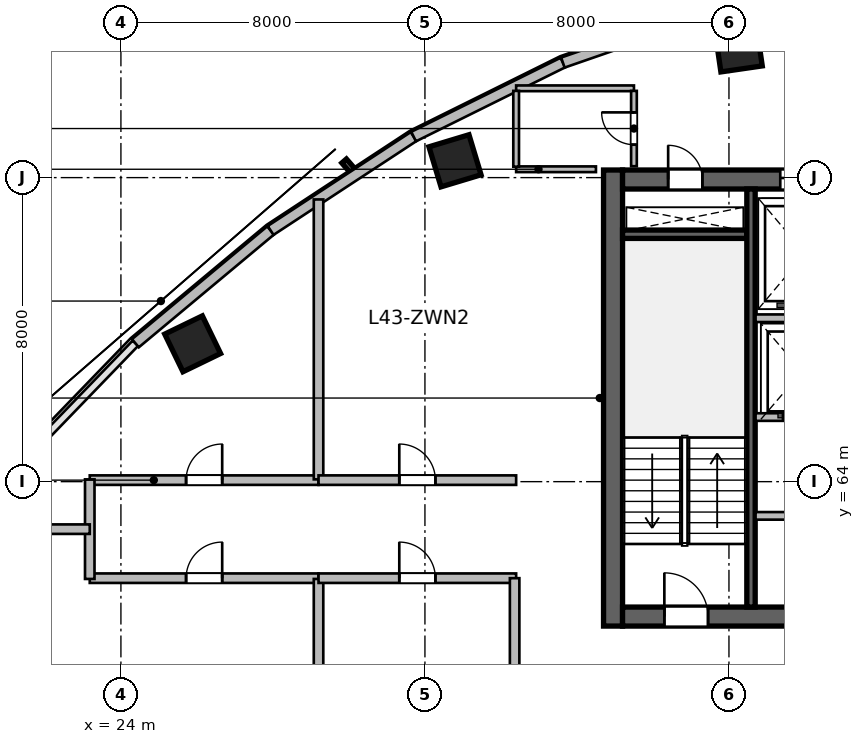
"""IFC4 building model, lengths in metres.
Left out: names, types, materials, properties, quantities, classifications, styles, units other than length and angle.
Written with IfcOpenShell. Run it as: python <this file> out.ifc"""

import sys

from ifc_helpers import new_model, si_unit, direction, frame, frame_2d, origin, origin_2d, place, context, subcontext, project, spatial, rectangle, extrude, source, transform, mapped, element, fill, save


model = new_model("IFC4")
c1 = context("Model", 3, precision=1e-05, world=origin(), true_north=direction((0.0, 1.0)))
c2 = subcontext(c1, "Body", "Model", "MODEL_VIEW")
j1 = project(units=[si_unit("LENGTHUNIT", "METRE"), si_unit("PLANEANGLEUNIT", "RADIAN")], contexts=[c1])
p1 = place(None, origin())
s1 = spatial("IfcSite", under=j1, at=p1, CompositionType="ELEMENT")
p2 = place(p1, origin())
s2 = spatial("IfcBuilding", under=s1, at=p2, CompositionType="ELEMENT")
p3 = place(p2, frame((0.0, 0.0, 177.9)))
s3 = spatial("IfcBuildingStorey", under=s2, at=p3, CompositionType="ELEMENT", Elevation=177.9)
m1 = source(origin(), c2, "Body", "SweptSolid", [
    extrude(rectangle(XDim=12.0, YDim=0.5, at=frame_2d((6.0, 0.0))), origin(), (0.0, 0.0, 1.0), 3.9),
])
p4 = place(p3, frame((36.95, 60.2, 0.0), z_axis=(0.0, 0.0, 1.0), x_axis=(0.0, 1.0, 0.0)))
e1 = element("IfcWall", 1, at=p4, inside=s3, PredefinedType="SHEAR", context=c2, shape_type="MappedRepresentation", body=[
    mapped(m1, transform((0.0, 0.0, 0.0), scale=1.0)),
])
m2 = source(origin(), c2, "Body", "SweptSolid", [
    extrude(rectangle(XDim=21.6, YDim=0.5, at=frame_2d((10.8, 0.0))), origin(), (0.0, 0.0, 1.0), 3.9),
])
p5 = place(p3, frame((37.2, 60.45, 0.0), z_axis=(0.0, 0.0, 1.0), x_axis=(1.0, 0.0, 0.0)))
e2 = element("IfcWall", 2, at=p5, inside=s3, PredefinedType="SHEAR", context=c2, shape_type="MappedRepresentation", body=[
    mapped(m2, transform((0.0, 0.0, 0.0), scale=1.0)),
])
p6 = place(p5, frame((1.1, 0.0, 0.0)))
e3 = element("IfcOpeningElement", 3, at=p6, cuts=e2, PredefinedType="OPENING", context=c2, shape_type="SweptSolid", body=[
    extrude(rectangle(XDim=1.15, YDim=2.15, at=frame_2d((0.575, 1.075))), frame((0.0, 0.26, 0.0), z_axis=(0.0, -1.0, 0.0), x_axis=(1.0, 0.0, 0.0)), (0.0, 0.0, 1.0), 0.52),
])
p7 = place(p5, frame((19.5, 0.0, 0.0)))
e4 = element("IfcOpeningElement", 4, at=p7, cuts=e2, PredefinedType="OPENING", context=c2, shape_type="SweptSolid", body=[
    extrude(rectangle(XDim=0.9, YDim=2.1, at=frame_2d((0.45, 1.05))), frame((0.0, 0.26, 0.0), z_axis=(0.0, -1.0, 0.0), x_axis=(1.0, 0.0, 0.0)), (0.0, 0.0, 1.0), 0.52),
])
p8 = place(p5, frame((12.02, 0.0, 0.0)))
e5 = element("IfcOpeningElement", 5, at=p8, cuts=e2, PredefinedType="OPENING", context=c2, shape_type="SweptSolid", body=[
    extrude(rectangle(XDim=1.6, YDim=2.15, at=frame_2d((0.8, 1.075))), frame((0.0, 0.26, 0.0), z_axis=(0.0, -1.0, 0.0), x_axis=(1.0, 0.0, 0.0)), (0.0, 0.0, 1.0), 0.52),
])
p9 = place(p3, frame((37.2, 71.95, 0.0), z_axis=(0.0, 0.0, 1.0), x_axis=(1.0, 0.0, 0.0)))
e6 = element("IfcWall", 6, at=p9, inside=s3, PredefinedType="SHEAR", context=c2, shape_type="MappedRepresentation", body=[
    mapped(m2, transform((0.0, 0.0, 0.0), scale=1.0)),
])
p10 = place(p9, frame((1.2, 0.0, 0.0)))
e7 = element("IfcOpeningElement", 7, at=p10, cuts=e6, PredefinedType="OPENING", context=c2, shape_type="SweptSolid", body=[
    extrude(rectangle(XDim=0.9, YDim=2.1, at=frame_2d((0.45, 1.05))), frame((0.0, 0.26, 0.0), z_axis=(0.0, -1.0, 0.0), x_axis=(1.0, 0.0, 0.0)), (0.0, 0.0, 1.0), 0.52),
])
p11 = place(p9, frame((14.7, 0.0, 0.0)))
e8 = element("IfcOpeningElement", 8, at=p11, cuts=e6, PredefinedType="OPENING", context=c2, shape_type="SweptSolid", body=[
    extrude(rectangle(XDim=1.2, YDim=2.15, at=frame_2d((0.6, 1.075))), frame((0.0, 0.26, 0.0), z_axis=(0.0, -1.0, 0.0), x_axis=(1.0, 0.0, 0.0)), (0.0, 0.0, 1.0), 0.52),
])
p12 = place(p9, frame((4.15, 0.0, 0.0)))
e9 = element("IfcOpeningElement", 9, at=p12, cuts=e6, PredefinedType="OPENING", context=c2, shape_type="SweptSolid", body=[
    extrude(rectangle(XDim=1.3, YDim=2.15, at=frame_2d((0.65, 1.075))), frame((0.0, 0.26, 0.0), z_axis=(0.0, -1.0, 0.0), x_axis=(1.0, 0.0, 0.0)), (0.0, 0.0, 1.0), 0.52),
])
p13 = place(p9, frame((6.76, 0.0, 0.0)))
e10 = element("IfcOpeningElement", 10, at=p13, cuts=e6, PredefinedType="OPENING", context=c2, shape_type="SweptSolid", body=[
    extrude(rectangle(XDim=0.85, YDim=2.1, at=frame_2d((0.425, 1.05))), frame((0.0, 0.26, 0.0), z_axis=(0.0, -1.0, 0.0), x_axis=(1.0, 0.0, 0.0)), (0.0, 0.0, 1.0), 0.52),
])
p14 = place(p9, frame((8.76, 0.0, 0.0)))
e11 = element("IfcOpeningElement", 11, at=p14, cuts=e6, PredefinedType="OPENING", context=c2, shape_type="SweptSolid", body=[
    extrude(rectangle(XDim=0.85, YDim=2.1, at=frame_2d((0.425, 1.05))), frame((0.0, 0.26, 0.0), z_axis=(0.0, -1.0, 0.0), x_axis=(1.0, 0.0, 0.0)), (0.0, 0.0, 1.0), 0.52),
])
p15 = place(p9, frame((10.725, 0.0, 0.0)))
e12 = element("IfcOpeningElement", 12, at=p15, cuts=e6, PredefinedType="OPENING", context=c2, shape_type="SweptSolid", body=[
    extrude(rectangle(XDim=0.85, YDim=2.1, at=frame_2d((0.425, 1.05))), frame((0.0, 0.26, 0.0), z_axis=(0.0, -1.0, 0.0), x_axis=(1.0, 0.0, 0.0)), (0.0, 0.0, 1.0), 0.52),
])
m3 = source(origin(), c2, "Body", "SweptSolid", [
    extrude(rectangle(XDim=3.27, YDim=0.22, at=frame_2d((1.635, 0.0))), origin(), (0.0, 0.0, 1.0), 3.9),
])
p16 = place(p3, frame((37.2, 70.51, 0.0), z_axis=(0.0, 0.0, 1.0), x_axis=(1.0, 0.0, 0.0)))
e13 = element("IfcWall", 13, at=p16, inside=s3, PredefinedType="SHEAR", context=c2, shape_type="MappedRepresentation", body=[
    mapped(m3, transform((0.0, 0.0, 0.0), scale=1.0)),
])
m4 = source(origin(), c2, "Body", "SweptSolid", [
    extrude(rectangle(XDim=11.0, YDim=0.22, at=frame_2d((5.5, 0.0))), origin(), (0.0, 0.0, 1.0), 3.9),
])
p17 = place(p3, frame((40.58, 60.7, 0.0), z_axis=(0.0, 0.0, 1.0), x_axis=(0.0, 1.0, 0.0)))
e14 = element("IfcWall", 14, at=p17, inside=s3, PredefinedType="SHEAR", context=c2, shape_type="MappedRepresentation", body=[
    mapped(m4, transform((0.0, 0.0, 0.0), scale=1.0)),
])
m5 = source(origin(), c2, "Body", "SweptSolid", [
    extrude(rectangle(XDim=1.1, YDim=1.1, at=origin_2d()), origin(), (0.0, 0.0, 1.0), 3.9),
])
for number, where, z_axis, x_axis in (
    (15, (25.888, 67.627, 0.0), (0.0, 0.0, 1.0), (-0.436, 0.9, 0.0)),
    (16, (32.791, 72.442, 0.0), (0.0, 0.0, 1.0), (-0.289, 0.957, 0.0)),
    (17, (40.253, 75.404, 0.0), (0.0, 0.0, 1.0), (-0.143, 0.99, 0.0)),
):
    element("IfcColumn", number, at=place(p3, frame(where, z_axis=z_axis, x_axis=x_axis)), inside=s3, PredefinedType="COLUMN", context=c2, shape_type="MappedRepresentation", body=[
        mapped(m5, transform((0.0, 0.0, 0.0), scale=1.0)),
    ])
m6 = source(origin(), c2, "Body", "SweptSolid", [
    extrude(rectangle(XDim=4.634, YDim=0.28, at=frame_2d((2.317, 0.0))), origin(), (0.0, 0.0, 1.0), 3.65),
])
p18 = place(p3, frame((24.381, 67.642, 0.0), z_axis=(0.0, 0.0, 1.0), x_axis=(0.767910229096, 0.640557475993, 0.0)))
e18 = element("IfcWall", 18, at=p18, inside=s3, PredefinedType="SOLIDWALL", context=c2, shape_type="MappedRepresentation", body=[
    mapped(m6, transform((0.0, 0.0, 0.0), scale=1.0)),
])
m7 = source(origin(), c2, "Body", "SweptSolid", [
    extrude(rectangle(XDim=4.501, YDim=0.28, at=frame_2d((2.25, 0.0))), origin(), (0.0, 0.0, 1.0), 3.65),
])
p19 = place(p3, frame((27.939, 70.61, 0.0), z_axis=(0.0, 0.0, 1.0), x_axis=(0.835984920737, 0.548752414391, 0.0)))
e19 = element("IfcWall", 19, at=p19, inside=s3, PredefinedType="SOLIDWALL", context=c2, shape_type="MappedRepresentation", body=[
    mapped(m7, transform((0.0, 0.0, 0.0), scale=1.0)),
])
m8 = source(origin(), c2, "Body", "SweptSolid", [
    extrude(rectangle(XDim=4.384, YDim=0.28, at=frame_2d((2.192, 0.0))), origin(), (0.0, 0.0, 1.0), 3.65),
])
p20 = place(p3, frame((31.702, 73.08, 0.0), z_axis=(0.0, 0.0, 1.0), x_axis=(0.895969968053, 0.444114643248, 0.0)))
e20 = element("IfcWall", 20, at=p20, inside=s3, PredefinedType="SOLIDWALL", context=c2, shape_type="MappedRepresentation", body=[
    mapped(m8, transform((0.0, 0.0, 0.0), scale=1.0)),
])
m9 = source(origin(), c2, "Body", "SweptSolid", [
    extrude(rectangle(XDim=4.29, YDim=0.28, at=frame_2d((2.145, 0.0))), origin(), (0.0, 0.0, 1.0), 3.65),
])
p21 = place(p3, frame((35.63, 75.027, 0.0), z_axis=(0.0, 0.0, 1.0), x_axis=(0.944883859218, 0.3274057003, 0.0)))
e21 = element("IfcWall", 21, at=p21, inside=s3, PredefinedType="SOLIDWALL", context=c2, shape_type="MappedRepresentation", body=[
    mapped(m9, transform((0.0, 0.0, 0.0), scale=1.0)),
])
m10 = source(origin(), c2, "Body", "SweptSolid", [
    extrude(rectangle(XDim=8.8, YDim=0.2, at=frame_2d((4.4, 0.0))), origin(), (0.0, 0.0, 1.0), 3.65),
])
p22 = place(p3, frame((40.7, 68.3, 0.0), z_axis=(0.0, 0.0, 1.0), x_axis=(1.0, 0.0, 0.0)))
e22 = element("IfcWall", 22, at=p22, inside=s3, PredefinedType="SOLIDWALL", context=c2, shape_type="MappedRepresentation", body=[
    mapped(m10, transform((0.0, 0.0, 0.0), scale=1.0)),
])
m11 = source(origin(), c2, "Body", "SweptSolid", [
    extrude(rectangle(XDim=8.02, YDim=0.2, at=frame_2d((4.01, 0.0))), origin(), (0.0, 0.0, 1.0), 3.65),
])
p23 = place(p3, frame((40.7, 63.1, 0.0), z_axis=(0.0, 0.0, 1.0), x_axis=(1.0, 0.0, 0.0)))
e23 = element("IfcWall", 23, at=p23, inside=s3, PredefinedType="SOLIDWALL", context=c2, shape_type="MappedRepresentation", body=[
    mapped(m11, transform((0.0, 0.0, 0.0), scale=1.0)),
])
p24 = place(p23, frame((2.15, 0.0, 0.0)))
e24 = element("IfcOpeningElement", 24, at=p24, cuts=e23, PredefinedType="OPENING", context=c2, shape_type="SweptSolid", body=[
    extrude(rectangle(XDim=0.9, YDim=2.1, at=frame_2d((0.45, 1.05))), frame((0.0, 0.11, 0.0), z_axis=(0.0, -1.0, 0.0), x_axis=(1.0, 0.0, 0.0)), (0.0, 0.0, 1.0), 0.22),
])
p25 = place(p23, frame((6.09, 0.0, 0.0)))
e25 = element("IfcOpeningElement", 25, at=p25, cuts=e23, PredefinedType="OPENING", context=c2, shape_type="SweptSolid", body=[
    extrude(rectangle(XDim=0.9, YDim=2.1, at=frame_2d((0.45, 1.05))), frame((0.0, 0.11, 0.0), z_axis=(0.0, -1.0, 0.0), x_axis=(1.0, 0.0, 0.0)), (0.0, 0.0, 1.0), 0.22),
])
p26 = place(p3, frame((40.7, 65.7, 0.0), z_axis=(0.0, 0.0, 1.0), x_axis=(1.0, 0.0, 0.0)))
e26 = element("IfcWall", 26, at=p26, inside=s3, PredefinedType="SOLIDWALL", context=c2, shape_type="MappedRepresentation", body=[
    mapped(m10, transform((0.0, 0.0, 0.0), scale=1.0)),
])
p27 = place(p26, frame((0.72, 0.0, 0.0)))
e27 = element("IfcOpeningElement", 27, at=p27, cuts=e26, PredefinedType="OPENING", context=c2, shape_type="SweptSolid", body=[
    extrude(rectangle(XDim=1.0, YDim=2.15, at=frame_2d((0.5, 1.075))), frame((0.0, 0.11, 0.0), z_axis=(0.0, -1.0, 0.0), x_axis=(1.0, 0.0, 0.0)), (0.0, 0.0, 1.0), 0.22),
])
p28 = place(p26, frame((2.62, 0.0, 0.0)))
e28 = element("IfcOpeningElement", 28, at=p28, cuts=e26, PredefinedType="OPENING", context=c2, shape_type="SweptSolid", body=[
    extrude(rectangle(XDim=1.0, YDim=2.15, at=frame_2d((0.5, 1.075))), frame((0.0, 0.11, 0.0), z_axis=(0.0, -1.0, 0.0), x_axis=(1.0, 0.0, 0.0)), (0.0, 0.0, 1.0), 0.22),
])
p29 = place(p26, frame((4.55, 0.0, 0.0)))
e29 = element("IfcOpeningElement", 29, at=p29, cuts=e26, PredefinedType="OPENING", context=c2, shape_type="SweptSolid", body=[
    extrude(rectangle(XDim=1.0, YDim=2.15, at=frame_2d((0.5, 1.075))), frame((0.0, 0.11, 0.0), z_axis=(0.0, -1.0, 0.0), x_axis=(1.0, 0.0, 0.0)), (0.0, 0.0, 1.0), 0.22),
])
p30 = place(p26, frame((6.55, 0.0, 0.0)))
e30 = element("IfcOpeningElement", 30, at=p30, cuts=e26, PredefinedType="OPENING", context=c2, shape_type="SweptSolid", body=[
    extrude(rectangle(XDim=1.0, YDim=2.15, at=frame_2d((0.5, 1.075))), frame((0.0, 0.11, 0.0), z_axis=(0.0, -1.0, 0.0), x_axis=(1.0, 0.0, 0.0)), (0.0, 0.0, 1.0), 0.22),
])
m12 = source(origin(), c2, "Body", "SweptSolid", [
    extrude(rectangle(XDim=2.1, YDim=0.15, at=frame_2d((1.05, 0.0))), origin(), (0.0, 0.0, 1.0), 3.65),
])
p31 = place(p3, frame((34.4, 72.22, 0.0), z_axis=(0.0, 0.0, 1.0), x_axis=(1.0, 0.0, 0.0)))
e31 = element("IfcWall", 31, at=p31, inside=s3, PredefinedType="PARTITIONING", context=c2, shape_type="MappedRepresentation", body=[
    mapped(m12, transform((0.0, 0.0, 0.0), scale=1.0)),
])
m13 = source(origin(), c2, "Body", "SweptSolid", [
    extrude(rectangle(XDim=3.1, YDim=0.15, at=frame_2d((1.55, 0.0))), origin(), (0.0, 0.0, 1.0), 3.022),
])
p32 = place(p3, frame((34.4, 74.35, 0.0), z_axis=(0.0, 0.0, 1.0), x_axis=(1.0, 0.0, 0.0)))
e32 = element("IfcWall", 32, at=p32, inside=s3, PredefinedType="PARTITIONING", context=c2, shape_type="MappedRepresentation", body=[
    mapped(m13, transform((0.0, 0.0, 0.0), scale=1.0)),
])
m14 = source(origin(), c2, "Body", "SweptSolid", [
    extrude(rectangle(XDim=1.995, YDim=0.15, at=frame_2d((0.998, 0.0))), origin(), (0.0, 0.0, 1.0), 3.65),
])
p33 = place(p3, frame((34.4, 72.288, 0.0), z_axis=(0.0, 0.0, 1.0), x_axis=(0.0, 1.0, 0.0)))
e33 = element("IfcWall", 33, at=p33, inside=s3, PredefinedType="PARTITIONING", context=c2, shape_type="MappedRepresentation", body=[
    mapped(m14, transform((0.0, 0.0, 0.0), scale=1.0)),
])
m15 = source(origin(), c2, "Body", "SweptSolid", [
    extrude(rectangle(XDim=1.982, YDim=0.15, at=frame_2d((0.991, 0.0))), origin(), (0.0, 0.0, 1.0), 3.65),
])
p34 = place(p3, frame((37.5, 72.3, 0.0), z_axis=(0.0, 0.0, 1.0), x_axis=(0.0, 1.0, 0.0)))
e34 = element("IfcWall", 34, at=p34, inside=s3, PredefinedType="PARTITIONING", context=c2, shape_type="MappedRepresentation", body=[
    mapped(m15, transform((0.0, 0.0, 0.0), scale=1.0)),
])
p35 = place(p34, frame((0.566, 0.0, 0.0)))
e35 = element("IfcOpeningElement", 35, at=p35, cuts=e34, PredefinedType="OPENING", context=c2, shape_type="SweptSolid", body=[
    extrude(rectangle(XDim=0.85, YDim=2.1, at=frame_2d((0.425, 1.05))), frame((0.0, 0.085, 0.0), z_axis=(0.0, -1.0, 0.0), x_axis=(1.0, 0.0, 0.0)), (0.0, 0.0, 1.0), 0.17),
])
m16 = source(origin(), c2, "Body", "SweptSolid", [
    extrude(rectangle(XDim=6.02, YDim=0.25, at=frame_2d((3.01, 0.0))), origin(), (0.0, 0.0, 1.0), 3.65),
])
p36 = place(p3, frame((23.18, 64.04, 0.0), z_axis=(0.0, 0.0, 1.0), x_axis=(1.0, 0.0, 0.0)))
e36 = element("IfcWall", 36, at=p36, inside=s3, PredefinedType="PARTITIONING", context=c2, shape_type="MappedRepresentation", body=[
    mapped(m16, transform((0.0, 0.0, 0.0), scale=1.0)),
])
p37 = place(p36, frame((2.535, 0.0, 0.0)))
e37 = element("IfcOpeningElement", 37, at=p37, cuts=e36, PredefinedType="OPENING", context=c2, shape_type="SweptSolid", body=[
    extrude(rectangle(XDim=0.95, YDim=2.1, at=frame_2d((0.475, 1.05))), frame((0.0, 0.135, 0.0), z_axis=(0.0, -1.0, 0.0), x_axis=(1.0, 0.0, 0.0)), (0.0, 0.0, 1.0), 0.27),
])
m17 = source(origin(), c2, "Body", "SweptSolid", [
    extrude(rectangle(XDim=7.365, YDim=0.25, at=frame_2d((3.683, 0.0))), origin(), (0.0, 0.0, 1.0), 3.65),
])
p38 = place(p3, frame((29.2, 64.06, 0.0), z_axis=(0.0, 0.0, 1.0), x_axis=(0.0, 1.0, 0.0)))
e38 = element("IfcWall", 38, at=p38, inside=s3, PredefinedType="PARTITIONING", context=c2, shape_type="MappedRepresentation", body=[
    mapped(m17, transform((0.0, 0.0, 0.0), scale=1.0)),
])
m18 = source(origin(), c2, "Body", "SweptSolid", [
    extrude(rectangle(XDim=5.2, YDim=0.25, at=frame_2d((2.6, 0.0))), origin(), (0.0, 0.0, 1.0), 3.65),
])
p39 = place(p3, frame((29.2, 64.04, 0.0), z_axis=(0.0, 0.0, 1.0), x_axis=(1.0, 0.0, 0.0)))
e39 = element("IfcWall", 39, at=p39, inside=s3, PredefinedType="PARTITIONING", context=c2, shape_type="MappedRepresentation", body=[
    mapped(m18, transform((0.0, 0.0, 0.0), scale=1.0)),
])
p40 = place(p39, frame((2.125, 0.0, 0.0)))
e40 = element("IfcOpeningElement", 40, at=p40, cuts=e39, PredefinedType="OPENING", context=c2, shape_type="SweptSolid", body=[
    extrude(rectangle(XDim=0.95, YDim=2.1, at=frame_2d((0.475, 1.05))), frame((0.0, 0.135, 0.0), z_axis=(0.0, -1.0, 0.0), x_axis=(1.0, 0.0, 0.0)), (0.0, 0.0, 1.0), 0.27),
])
p41 = place(p3, frame((23.18, 61.46, 0.0), z_axis=(0.0, 0.0, 1.0), x_axis=(1.0, 0.0, 0.0)))
e41 = element("IfcWall", 41, at=p41, inside=s3, PredefinedType="PARTITIONING", context=c2, shape_type="MappedRepresentation", body=[
    mapped(m16, transform((0.0, 0.0, 0.0), scale=1.0)),
])
p42 = place(p41, frame((2.535, 0.0, 0.0)))
e42 = element("IfcOpeningElement", 42, at=p42, cuts=e41, PredefinedType="OPENING", context=c2, shape_type="SweptSolid", body=[
    extrude(rectangle(XDim=0.95, YDim=2.1, at=frame_2d((0.475, 1.05))), frame((0.0, 0.135, 0.0), z_axis=(0.0, -1.0, 0.0), x_axis=(1.0, 0.0, 0.0)), (0.0, 0.0, 1.0), 0.27),
])
m19 = source(origin(), c2, "Body", "SweptSolid", [
    extrude(rectangle(XDim=18.301, YDim=0.25, at=frame_2d((9.15, 0.0))), origin(), (0.0, 0.0, 1.0), 2.942),
])
p43 = place(p3, frame((29.2, 43.139, 0.0), z_axis=(0.0, 0.0, 1.0), x_axis=(0.0, 1.0, 0.0)))
e43 = element("IfcWall", 43, at=p43, inside=s3, PredefinedType="PARTITIONING", context=c2, shape_type="MappedRepresentation", body=[
    mapped(m19, transform((0.0, 0.0, 0.0), scale=1.0)),
])
p44 = place(p3, frame((29.2, 61.46, 0.0), z_axis=(0.0, 0.0, 1.0), x_axis=(1.0, 0.0, 0.0)))
e44 = element("IfcWall", 44, at=p44, inside=s3, PredefinedType="PARTITIONING", context=c2, shape_type="MappedRepresentation", body=[
    mapped(m18, transform((0.0, 0.0, 0.0), scale=1.0)),
])
p45 = place(p44, frame((2.125, 0.0, 0.0)))
e45 = element("IfcOpeningElement", 45, at=p45, cuts=e44, PredefinedType="OPENING", context=c2, shape_type="SweptSolid", body=[
    extrude(rectangle(XDim=0.95, YDim=2.1, at=frame_2d((0.475, 1.05))), frame((0.0, 0.135, 0.0), z_axis=(0.0, -1.0, 0.0), x_axis=(1.0, 0.0, 0.0)), (0.0, 0.0, 1.0), 0.27),
])
m20 = source(origin(), c2, "Body", "SweptSolid", [
    extrude(rectangle(XDim=12.126, YDim=0.25, at=frame_2d((6.063, 0.0))), origin(), (0.0, 0.0, 1.0), 3.65),
])
p46 = place(p3, frame((34.36, 49.334, 0.0), z_axis=(0.0, 0.0, 1.0), x_axis=(0.0, 1.0, 0.0)))
e46 = element("IfcWall", 46, at=p46, inside=s3, PredefinedType="PARTITIONING", context=c2, shape_type="MappedRepresentation", body=[
    mapped(m20, transform((0.0, 0.0, 0.0), scale=1.0)),
])
m21 = source(origin(), c2, "Body", "SweptSolid", [
    extrude(rectangle(XDim=2.62, YDim=0.25, at=frame_2d((1.31, 0.0))), origin(), (0.0, 0.0, 1.0), 3.65),
])
p47 = place(p3, frame((23.18, 61.44, 0.0), z_axis=(0.0, 0.0, 1.0), x_axis=(0.0, 1.0, 0.0)))
e47 = element("IfcWall", 47, at=p47, inside=s3, PredefinedType="PARTITIONING", context=c2, shape_type="MappedRepresentation", body=[
    mapped(m21, transform((0.0, 0.0, 0.0), scale=1.0)),
])
m22 = source(origin(), c2, "Body", "SweptSolid", [
    extrude(rectangle(XDim=3.249, YDim=0.25, at=frame_2d((1.625, 0.0))), origin(), (0.0, 0.0, 1.0), 3.65),
])
p48 = place(p3, frame((19.931, 62.75, 0.0), z_axis=(0.0, 0.0, 1.0), x_axis=(1.0, 0.0, 0.0)))
e48 = element("IfcWall", 48, at=p48, inside=s3, PredefinedType="PARTITIONING", context=c2, shape_type="MappedRepresentation", body=[
    mapped(m22, transform((0.0, 0.0, 0.0), scale=1.0)),
])
m23 = source(origin(), c2, "Body", "SweptSolid", [
    extrude(rectangle(XDim=1.15, YDim=2.15, at=frame_2d((0.575, 1.075))), frame((0.0, 0.025, 0.0), z_axis=(0.0, -1.0, 0.0), x_axis=(1.0, 0.0, 0.0)), (0.0, 0.0, 1.0), 0.05),
])
p49 = place(p6, origin())
e49 = element("IfcDoor", 49, at=p49, inside=s3, OperationType="SINGLE_SWING_LEFT", PredefinedType="DOOR", context=c2, shape_type="MappedRepresentation", body=[
    mapped(m23, transform((0.0, 0.0, 0.0), scale=1.0)),
])
fill(e3, e49)
m24 = source(origin(), c2, "Body", "SweptSolid", [
    extrude(rectangle(XDim=0.9, YDim=2.1, at=frame_2d((0.45, 1.05))), frame((0.0, 0.025, 0.0), z_axis=(0.0, -1.0, 0.0), x_axis=(1.0, 0.0, 0.0)), (0.0, 0.0, 1.0), 0.05),
])
p50 = place(p10, origin())
e50 = element("IfcDoor", 50, at=p50, inside=s3, OperationType="SINGLE_SWING_LEFT", PredefinedType="DOOR", context=c2, shape_type="MappedRepresentation", body=[
    mapped(m24, transform((0.0, 0.0, 0.0), scale=1.0)),
])
fill(e7, e50)
m25 = source(origin(), c2, "Body", "SweptSolid", [
    extrude(rectangle(XDim=1.3, YDim=2.15, at=frame_2d((0.65, 1.075))), frame((0.0, 0.025, 0.0), z_axis=(0.0, -1.0, 0.0), x_axis=(1.0, 0.0, 0.0)), (0.0, 0.0, 1.0), 0.05),
])
p51 = place(p12, origin())
e51 = element("IfcDoor", 51, at=p51, inside=s3, OperationType="DOUBLE_DOOR_SLIDING", PredefinedType="DOOR", context=c2, shape_type="MappedRepresentation", body=[
    mapped(m25, transform((0.0, 0.0, 0.0), scale=1.0)),
])
fill(e9, e51)
m26 = source(origin(), c2, "Body", "SweptSolid", [
    extrude(rectangle(XDim=1.0, YDim=2.15, at=frame_2d((0.5, 1.075))), frame((0.0, 0.025, 0.0), z_axis=(0.0, -1.0, 0.0), x_axis=(1.0, 0.0, 0.0)), (0.0, 0.0, 1.0), 0.05),
])
p52 = place(p27, origin())
e52 = element("IfcDoor", 52, at=p52, inside=s3, OperationType="DOUBLE_DOOR_SLIDING", PredefinedType="DOOR", context=c2, shape_type="MappedRepresentation", body=[
    mapped(m26, transform((0.0, 0.0, 0.0), scale=1.0)),
])
fill(e27, e52)
m27 = source(origin(), c2, "Body", "SweptSolid", [
    extrude(rectangle(XDim=0.85, YDim=2.1, at=frame_2d((0.425, 1.05))), frame((0.0, 0.025, 0.0), z_axis=(0.0, -1.0, 0.0), x_axis=(1.0, 0.0, 0.0)), (0.0, 0.0, 1.0), 0.05),
])
p53 = place(p35, origin())
e53 = element("IfcDoor", 53, at=p53, inside=s3, OperationType="SINGLE_SWING_RIGHT", PredefinedType="DOOR", context=c2, shape_type="MappedRepresentation", body=[
    mapped(m27, transform((0.0, 0.0, 0.0), scale=1.0)),
])
fill(e35, e53)
m28 = source(origin(), c2, "Body", "SweptSolid", [
    extrude(rectangle(XDim=0.95, YDim=2.1, at=frame_2d((0.475, 1.05))), frame((0.0, 0.025, 0.0), z_axis=(0.0, -1.0, 0.0), x_axis=(1.0, 0.0, 0.0)), (0.0, 0.0, 1.0), 0.05),
])
p54 = place(p37, origin())
e54 = element("IfcDoor", 54, at=p54, inside=s3, OperationType="SINGLE_SWING_RIGHT", PredefinedType="DOOR", context=c2, shape_type="MappedRepresentation", body=[
    mapped(m28, transform((0.0, 0.0, 0.0), scale=1.0)),
])
fill(e37, e54)
p55 = place(p40, origin())
e55 = element("IfcDoor", 55, at=p55, inside=s3, OperationType="SINGLE_SWING_LEFT", PredefinedType="DOOR", context=c2, shape_type="MappedRepresentation", body=[
    mapped(m28, transform((0.0, 0.0, 0.0), scale=1.0)),
])
fill(e40, e55)
p56 = place(p42, origin())
e56 = element("IfcDoor", 56, at=p56, inside=s3, OperationType="SINGLE_SWING_RIGHT", PredefinedType="DOOR", context=c2, shape_type="MappedRepresentation", body=[
    mapped(m28, transform((0.0, 0.0, 0.0), scale=1.0)),
])
fill(e42, e56)
p57 = place(p45, origin())
e57 = element("IfcDoor", 57, at=p57, inside=s3, OperationType="SINGLE_SWING_LEFT", PredefinedType="DOOR", context=c2, shape_type="MappedRepresentation", body=[
    mapped(m28, transform((0.0, 0.0, 0.0), scale=1.0)),
])
fill(e45, e57)
save(model, sys.argv[1])
